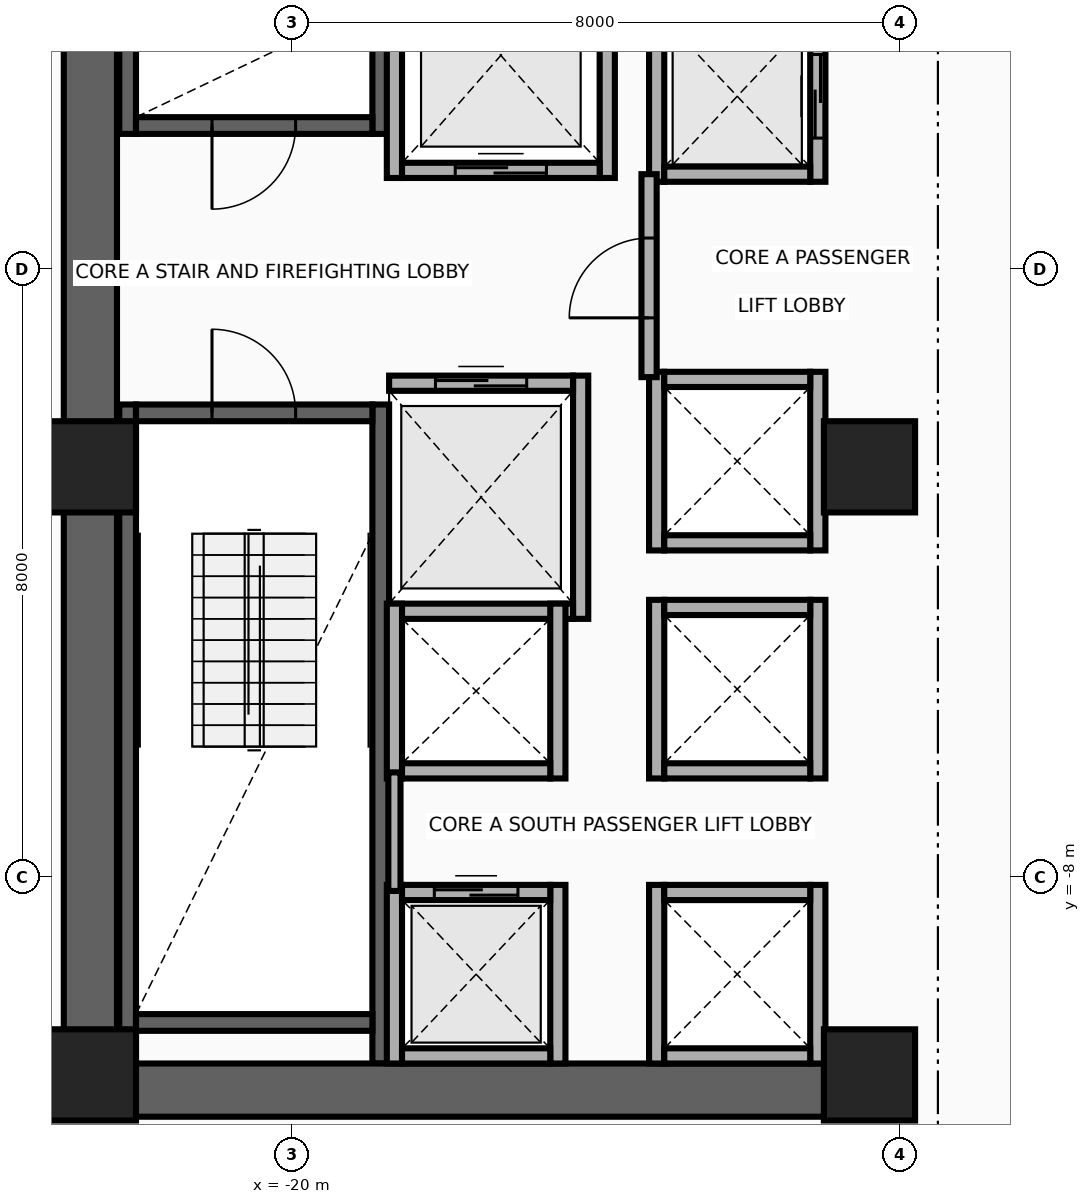
"""IFC4 building model, lengths in metres.
Left out: names, types, materials, properties, quantities, classifications, styles, units other than length and angle.
Written with IfcOpenShell. Run it as: python <this file> out.ifc"""

import sys

from ifc_helpers import new_model, si_unit, direction, frame, frame_2d, origin, origin_2d, place, context, subcontext, project, spatial, rectangle, extrude, source, transform, mapped, element, fill, save


model = new_model("IFC4")
c1 = context("Model", 3, precision=1e-05, world=origin(), true_north=direction((0.0, 1.0)))
c2 = subcontext(c1, "Body", "Model", "MODEL_VIEW")
j1 = project(units=[si_unit("LENGTHUNIT", "METRE"), si_unit("PLANEANGLEUNIT", "RADIAN")], contexts=[c1])
p1 = place(None, origin())
s1 = spatial("IfcSite", under=j1, at=p1, CompositionType="ELEMENT")
p2 = place(p1, origin())
s2 = spatial("IfcBuilding", under=s1, at=p2, CompositionType="ELEMENT")
p3 = place(p2, frame((0.0, 0.0, 105.7)))
s3 = spatial("IfcBuildingStorey", under=s2, at=p3, CompositionType="ELEMENT", Elevation=105.7)
for number, where, z_axis, x_axis in (
    (1, (-22.16, 1.78, 0.0), (0.0, 0.0, 1.0), (0.0, 1.0, 0.0)),
    (2, (-18.83, 1.78, 0.0), (0.0, 0.0, 1.0), (0.0, 1.0, 0.0)),
):
    element("IfcWall", number, at=place(p3, frame(where, z_axis=z_axis, x_axis=x_axis)), inside=s3, PredefinedType="SHEAR", context=c2, shape_type="SweptSolid", body=[
        extrude(rectangle(XDim=8.67, YDim=0.22, at=frame_2d((4.335, 0.0))), origin(), (0.0, 0.0, 1.0), 3.46),
    ])
p4 = place(p3, frame((-22.05, 1.89, 0.0), z_axis=(0.0, 0.0, 1.0), x_axis=(1.0, 0.0, 0.0)))
e3 = element("IfcWall", 3, at=p4, inside=s3, PredefinedType="SHEAR", context=c2, shape_type="SweptSolid", body=[
    extrude(rectangle(XDim=3.11, YDim=0.22, at=frame_2d((1.555, 0.0))), origin(), (0.0, 0.0, 1.0), 3.46),
])
p5 = place(p4, frame((1.0, 0.0, 0.0)))
e4 = element("IfcOpeningElement", 4, at=p5, cuts=e3, PredefinedType="OPENING", context=c2, shape_type="SweptSolid", body=[
    extrude(rectangle(XDim=1.1, YDim=2.15, at=frame_2d((0.55, 1.075))), frame((0.0, 0.125, 0.0), z_axis=(0.0, -1.0, 0.0), x_axis=(1.0, 0.0, 0.0)), (0.0, 0.0, 1.0), 0.25),
])
for number, where, z_axis, x_axis in (
    (5, (-22.16, -10.45, 0.0), (0.0, 0.0, 1.0), (0.0, 1.0, 0.0)),
    (6, (-18.83, -10.45, 0.0), (0.0, 0.0, 1.0), (0.0, 1.0, 0.0)),
):
    element("IfcWall", number, at=place(p3, frame(where, z_axis=z_axis, x_axis=x_axis)), inside=s3, PredefinedType="SHEAR", context=c2, shape_type="SweptSolid", body=[
        extrude(rectangle(XDim=8.67, YDim=0.22, at=frame_2d((4.335, 0.0))), origin(), (0.0, 0.0, 1.0), 3.46),
    ])
p6 = place(p3, frame((-22.05, -9.91, 0.0), z_axis=(0.0, 0.0, 1.0), x_axis=(1.0, 0.0, 0.0)))
e7 = element("IfcWall", 7, at=p6, inside=s3, PredefinedType="SHEAR", context=c2, shape_type="SweptSolid", body=[
    extrude(rectangle(XDim=3.11, YDim=0.22, at=frame_2d((1.555, 0.0))), origin(), (0.0, 0.0, 1.0), 3.46),
])
p7 = place(p3, frame((-22.05, -1.89, 0.0), z_axis=(0.0, 0.0, 1.0), x_axis=(1.0, 0.0, 0.0)))
e8 = element("IfcWall", 8, at=p7, inside=s3, PredefinedType="SHEAR", context=c2, shape_type="SweptSolid", body=[
    extrude(rectangle(XDim=3.11, YDim=0.22, at=frame_2d((1.555, 0.0))), origin(), (0.0, 0.0, 1.0), 3.46),
])
p8 = place(p7, frame((1.0, 0.0, 0.0)))
e9 = element("IfcOpeningElement", 9, at=p8, cuts=e8, PredefinedType="OPENING", context=c2, shape_type="SweptSolid", body=[
    extrude(rectangle(XDim=1.1, YDim=2.15, at=frame_2d((0.55, 1.075))), frame((0.0, 0.125, 0.0), z_axis=(0.0, -1.0, 0.0), x_axis=(1.0, 0.0, 0.0)), (0.0, 0.0, 1.0), 0.25),
])
p9 = place(p3, frame((-22.65, -11.15, 0.0), z_axis=(0.0, 0.0, 1.0), x_axis=(0.0, 1.0, 0.0)))
e10 = element("IfcWall", 10, at=p9, inside=s3, PredefinedType="SHEAR", context=c2, shape_type="SweptSolid", body=[
    extrude(rectangle(XDim=22.3, YDim=0.7, at=frame_2d((11.15, 0.0))), origin(), (0.0, 0.0, 1.0), 3.46),
])
p10 = place(p3, frame((-22.65, -10.8, 0.0), z_axis=(0.0, 0.0, 1.0), x_axis=(1.0, 0.0, 0.0)))
e11 = element("IfcWall", 11, at=p10, inside=s3, PredefinedType="SHEAR", context=c2, shape_type="SweptSolid", body=[
    extrude(rectangle(XDim=10.25, YDim=0.7, at=frame_2d((5.125, 0.0))), origin(), (0.0, 0.0, 1.0), 3.46),
])
m1 = source(origin(), c2, "Body", "SweptSolid", [
    extrude(rectangle(XDim=1.2, YDim=1.2, at=origin_2d()), origin(), (0.0, 0.0, 1.0), 3.7),
])
for number, where, z_axis, x_axis in (
    (12, (-22.65, -10.6, 0.0), (0.0, 0.0, 1.0), (1.0, 0.0, 0.0)),
    (13, (-12.4, -10.6, 0.0), (0.0, 0.0, 1.0), (1.0, 0.0, 0.0)),
    (14, (-22.65, -2.6, 0.0), (0.0, 0.0, 1.0), (1.0, 0.0, 0.0)),
    (15, (-12.4, -2.6, 0.0), (0.0, 0.0, 1.0), (1.0, 0.0, 0.0)),
):
    element("IfcColumn", number, at=place(p3, frame(where, z_axis=z_axis, x_axis=x_axis)), inside=s3, PredefinedType="COLUMN", context=c2, shape_type="MappedRepresentation", body=[
        mapped(m1, transform((0.0, 0.0, 0.0), x_axis=(1.0, 0.0, 0.0), y_axis=(0.0, 1.0, 0.0), z_axis=(0.0, 0.0, 1.0), scale=1.0)),
    ])
for number, where, z_axis, x_axis in (
    (16, (-18.65, 1.2, 0.0), (0.0, 0.0, 1.0), (0.0, 1.0, 0.0)),
    (17, (-15.85, 1.2, 0.0), (0.0, 0.0, 1.0), (0.0, 1.0, 0.0)),
):
    element("IfcWall", number, at=place(p3, frame(where, z_axis=z_axis, x_axis=x_axis)), inside=s3, PredefinedType="MOVABLE", context=c2, shape_type="SweptSolid", body=[
        extrude(rectangle(XDim=3.225, YDim=0.2, at=frame_2d((1.613, 0.0))), origin(), (0.0, 0.0, 1.0), 3.46),
    ])
p11 = place(p3, frame((-18.55, 1.3, 0.0), z_axis=(0.0, 0.0, 1.0), x_axis=(1.0, 0.0, 0.0)))
e18 = element("IfcWall", 18, at=p11, inside=s3, PredefinedType="MOVABLE", context=c2, shape_type="SweptSolid", body=[
    extrude(rectangle(XDim=2.6, YDim=0.2, at=frame_2d((1.3, 0.0))), origin(), (0.0, 0.0, 1.0), 3.46),
])
p12 = place(p11, frame((0.7, 0.0, 0.0)))
e19 = element("IfcOpeningElement", 19, at=p12, cuts=e18, PredefinedType="OPENING", context=c2, shape_type="SweptSolid", body=[
    extrude(rectangle(XDim=1.2, YDim=2.1, at=frame_2d((0.6, 1.05))), frame((0.0, 0.115, 0.0), z_axis=(0.0, -1.0, 0.0), x_axis=(1.0, 0.0, 0.0)), (0.0, 0.0, 1.0), 0.23),
])
p13 = place(p3, frame((-16.2, -4.6, 0.0), z_axis=(0.0, 0.0, 1.0), x_axis=(0.0, 1.0, 0.0)))
e20 = element("IfcWall", 20, at=p13, inside=s3, PredefinedType="MOVABLE", context=c2, shape_type="SweptSolid", body=[
    extrude(rectangle(XDim=3.2, YDim=0.2, at=frame_2d((1.6, 0.0))), origin(), (0.0, 0.0, 1.0), 3.46),
])
p14 = place(p3, frame((-18.72, -4.5, 0.0), z_axis=(0.0, 0.0, 1.0), x_axis=(1.0, 0.0, 0.0)))
e21 = element("IfcWall", 21, at=p14, inside=s3, PredefinedType="MOVABLE", context=c2, shape_type="SweptSolid", body=[
    extrude(rectangle(XDim=2.42, YDim=0.2, at=frame_2d((1.21, 0.0))), origin(), (0.0, 0.0, 1.0), 3.46),
])
p15 = place(p3, frame((-18.72, -1.5, 0.0), z_axis=(0.0, 0.0, 1.0), x_axis=(1.0, 0.0, 0.0)))
e22 = element("IfcWall", 22, at=p15, inside=s3, PredefinedType="MOVABLE", context=c2, shape_type="SweptSolid", body=[
    extrude(rectangle(XDim=2.42, YDim=0.2, at=frame_2d((1.21, 0.0))), origin(), (0.0, 0.0, 1.0), 3.46),
])
p16 = place(p15, frame((0.61, 0.0, 0.0)))
e23 = element("IfcOpeningElement", 23, at=p16, cuts=e22, PredefinedType="OPENING", context=c2, shape_type="SweptSolid", body=[
    extrude(rectangle(XDim=1.2, YDim=2.1, at=frame_2d((0.6, 1.05))), frame((0.0, 0.115, 0.0), z_axis=(0.0, -1.0, 0.0), x_axis=(1.0, 0.0, 0.0)), (0.0, 0.0, 1.0), 0.23),
])
for number, where, z_axis, x_axis in (
    (24, (-15.2, -10.45, 0.0), (0.0, 0.0, 1.0), (0.0, 1.0, 0.0)),
    (25, (-13.08, -10.45, 0.0), (0.0, 0.0, 1.0), (0.0, 1.0, 0.0)),
):
    element("IfcWall", number, at=place(p3, frame(where, z_axis=z_axis, x_axis=x_axis)), inside=s3, PredefinedType="MOVABLE", context=c2, shape_type="SweptSolid", body=[
        extrude(rectangle(XDim=2.35, YDim=0.2, at=frame_2d((1.175, 0.0))), origin(), (0.0, 0.0, 1.0), 2.666),
    ])
p17 = place(p3, frame((-15.1, -10.35, 0.0), z_axis=(0.0, 0.0, 1.0), x_axis=(1.0, 0.0, 0.0)))
e26 = element("IfcWall", 26, at=p17, inside=s3, PredefinedType="MOVABLE", context=c2, shape_type="SweptSolid", body=[
    extrude(rectangle(XDim=1.92, YDim=0.2, at=frame_2d((0.96, 0.0))), origin(), (0.0, 0.0, 1.0), 2.666),
])
p18 = place(p3, frame((-15.1, -8.2, 0.0), z_axis=(0.0, 0.0, 1.0), x_axis=(1.0, 0.0, 0.0)))
e27 = element("IfcWall", 27, at=p18, inside=s3, PredefinedType="MOVABLE", context=c2, shape_type="SweptSolid", body=[
    extrude(rectangle(XDim=1.92, YDim=0.2, at=frame_2d((0.96, 0.0))), origin(), (0.0, 0.0, 1.0), 3.46),
])
for number, where, z_axis, x_axis in (
    (28, (-15.2, -6.7, 0.0), (0.0, 0.0, 1.0), (0.0, 1.0, 0.0)),
    (29, (-13.08, -6.7, 0.0), (0.0, 0.0, 1.0), (0.0, 1.0, 0.0)),
):
    element("IfcWall", number, at=place(p3, frame(where, z_axis=z_axis, x_axis=x_axis)), inside=s3, PredefinedType="MOVABLE", context=c2, shape_type="SweptSolid", body=[
        extrude(rectangle(XDim=2.35, YDim=0.2, at=frame_2d((1.175, 0.0))), origin(), (0.0, 0.0, 1.0), 3.46),
    ])
for number, where, z_axis, x_axis in (
    (30, (-15.1, -6.6, 0.0), (0.0, 0.0, 1.0), (1.0, 0.0, 0.0)),
    (31, (-15.1, -4.45, 0.0), (0.0, 0.0, 1.0), (1.0, 0.0, 0.0)),
):
    element("IfcWall", number, at=place(p3, frame(where, z_axis=z_axis, x_axis=x_axis)), inside=s3, PredefinedType="MOVABLE", context=c2, shape_type="SweptSolid", body=[
        extrude(rectangle(XDim=1.92, YDim=0.2, at=frame_2d((0.96, 0.0))), origin(), (0.0, 0.0, 1.0), 3.46),
    ])
for number, where, z_axis, x_axis in (
    (32, (-18.65, -10.45, 0.0), (0.0, 0.0, 1.0), (0.0, 1.0, 0.0)),
    (33, (-16.5, -10.45, 0.0), (0.0, 0.0, 1.0), (0.0, 1.0, 0.0)),
):
    element("IfcWall", number, at=place(p3, frame(where, z_axis=z_axis, x_axis=x_axis)), inside=s3, PredefinedType="MOVABLE", context=c2, shape_type="SweptSolid", body=[
        extrude(rectangle(XDim=2.35, YDim=0.2, at=frame_2d((1.175, 0.0))), origin(), (0.0, 0.0, 1.0), 2.666),
    ])
p19 = place(p3, frame((-18.55, -10.35, 0.0), z_axis=(0.0, 0.0, 1.0), x_axis=(1.0, 0.0, 0.0)))
e34 = element("IfcWall", 34, at=p19, inside=s3, PredefinedType="MOVABLE", context=c2, shape_type="SweptSolid", body=[
    extrude(rectangle(XDim=1.95, YDim=0.2, at=frame_2d((0.975, 0.0))), origin(), (0.0, 0.0, 1.0), 2.666),
])
p20 = place(p3, frame((-18.55, -8.2, 0.0), z_axis=(0.0, 0.0, 1.0), x_axis=(1.0, 0.0, 0.0)))
e35 = element("IfcWall", 35, at=p20, inside=s3, PredefinedType="MOVABLE", context=c2, shape_type="SweptSolid", body=[
    extrude(rectangle(XDim=1.95, YDim=0.2, at=frame_2d((0.975, 0.0))), origin(), (0.0, 0.0, 1.0), 3.46),
])
p21 = place(p20, frame((0.425, 0.0, 0.0)))
e36 = element("IfcOpeningElement", 36, at=p21, cuts=e35, PredefinedType="OPENING", context=c2, shape_type="SweptSolid", body=[
    extrude(rectangle(XDim=1.1, YDim=2.1, at=frame_2d((0.55, 1.05))), frame((0.0, 0.115, 0.0), z_axis=(0.0, -1.0, 0.0), x_axis=(1.0, 0.0, 0.0)), (0.0, 0.0, 1.0), 0.23),
])
p22 = place(p3, frame((-15.2, 1.15, 0.0), z_axis=(0.0, 0.0, 1.0), x_axis=(0.0, 1.0, 0.0)))
e37 = element("IfcWall", 37, at=p22, inside=s3, PredefinedType="MOVABLE", context=c2, shape_type="SweptSolid", body=[
    extrude(rectangle(XDim=2.25, YDim=0.2, at=frame_2d((1.125, 0.0))), origin(), (0.0, 0.0, 1.0), 3.46),
])
p23 = place(p3, frame((-13.08, 1.15, 0.0), z_axis=(0.0, 0.0, 1.0), x_axis=(0.0, 1.0, 0.0)))
e38 = element("IfcWall", 38, at=p23, inside=s3, PredefinedType="MOVABLE", context=c2, shape_type="SweptSolid", body=[
    extrude(rectangle(XDim=2.25, YDim=0.2, at=frame_2d((1.125, 0.0))), origin(), (0.0, 0.0, 1.0), 3.46),
])
p24 = place(p23, frame((0.575, 0.0, 0.0)))
e39 = element("IfcOpeningElement", 39, at=p24, cuts=e38, PredefinedType="OPENING", context=c2, shape_type="SweptSolid", body=[
    extrude(rectangle(XDim=1.1, YDim=2.1, at=frame_2d((0.55, 1.05))), frame((0.0, 0.115, 0.0), z_axis=(0.0, -1.0, 0.0), x_axis=(1.0, 0.0, 0.0)), (0.0, 0.0, 1.0), 0.23),
])
p25 = place(p3, frame((-15.1, 1.25, 0.0), z_axis=(0.0, 0.0, 1.0), x_axis=(1.0, 0.0, 0.0)))
e40 = element("IfcWall", 40, at=p25, inside=s3, PredefinedType="MOVABLE", context=c2, shape_type="SweptSolid", body=[
    extrude(rectangle(XDim=1.92, YDim=0.2, at=frame_2d((0.96, 0.0))), origin(), (0.0, 0.0, 1.0), 3.46),
])
for number, where, z_axis, x_axis in (
    (41, (-18.65, -6.7, 0.0), (0.0, 0.0, 1.0), (0.0, 1.0, 0.0)),
    (42, (-16.5, -6.7, 0.0), (0.0, 0.0, 1.0), (0.0, 1.0, 0.0)),
):
    element("IfcWall", number, at=place(p3, frame(where, z_axis=z_axis, x_axis=x_axis)), inside=s3, PredefinedType="MOVABLE", context=c2, shape_type="SweptSolid", body=[
        extrude(rectangle(XDim=2.3, YDim=0.2, at=frame_2d((1.15, 0.0))), origin(), (0.0, 0.0, 1.0), 3.46),
    ])
p26 = place(p3, frame((-18.55, -6.6, 0.0), z_axis=(0.0, 0.0, 1.0), x_axis=(1.0, 0.0, 0.0)))
e43 = element("IfcWall", 43, at=p26, inside=s3, PredefinedType="MOVABLE", context=c2, shape_type="SweptSolid", body=[
    extrude(rectangle(XDim=1.95, YDim=0.2, at=frame_2d((0.975, 0.0))), origin(), (0.0, 0.0, 1.0), 3.46),
])
for number, where, z_axis, x_axis in (
    (44, (-15.2, -3.7, 0.0), (0.0, 0.0, 1.0), (0.0, 1.0, 0.0)),
    (45, (-13.08, -3.7, 0.0), (0.0, 0.0, 1.0), (0.0, 1.0, 0.0)),
):
    element("IfcWall", number, at=place(p3, frame(where, z_axis=z_axis, x_axis=x_axis)), inside=s3, PredefinedType="MOVABLE", context=c2, shape_type="SweptSolid", body=[
        extrude(rectangle(XDim=2.35, YDim=0.2, at=frame_2d((1.175, 0.0))), origin(), (0.0, 0.0, 1.0), 3.46),
    ])
for number, where, z_axis, x_axis in (
    (46, (-15.1, -3.6, 0.0), (0.0, 0.0, 1.0), (1.0, 0.0, 0.0)),
    (47, (-15.1, -1.45, 0.0), (0.0, 0.0, 1.0), (1.0, 0.0, 0.0)),
):
    element("IfcWall", number, at=place(p3, frame(where, z_axis=z_axis, x_axis=x_axis)), inside=s3, PredefinedType="MOVABLE", context=c2, shape_type="SweptSolid", body=[
        extrude(rectangle(XDim=1.92, YDim=0.2, at=frame_2d((0.96, 0.0))), origin(), (0.0, 0.0, 1.0), 3.46),
    ])
p27 = place(p3, frame((-15.3, -1.42, 0.0), z_axis=(0.0, 0.0, 1.0), x_axis=(0.0, 1.0, 0.0)))
e48 = element("IfcWall", 48, at=p27, inside=s3, PredefinedType="PARTITIONING", context=c2, shape_type="SweptSolid", body=[
    extrude(rectangle(XDim=2.67, YDim=0.2, at=frame_2d((1.335, 0.0))), origin(), (0.0, 0.0, 1.0), 3.46),
])
p28 = place(p27, frame((0.78, 0.0, 0.0)))
e49 = element("IfcOpeningElement", 49, at=p28, cuts=e48, PredefinedType="OPENING", context=c2, shape_type="SweptSolid", body=[
    extrude(rectangle(XDim=1.05, YDim=2.15, at=frame_2d((0.525, 1.075))), frame((0.0, 0.115, 0.0), z_axis=(0.0, -1.0, 0.0), x_axis=(1.0, 0.0, 0.0)), (0.0, 0.0, 1.0), 0.23),
])
p29 = place(p3, frame((-18.65, -8.18, 0.0), z_axis=(0.0, 0.0, 1.0), x_axis=(0.0, 1.0, 0.0)))
e50 = element("IfcWall", 50, at=p29, inside=s3, PredefinedType="PARTITIONING", context=c2, shape_type="SweptSolid", body=[
    extrude(rectangle(XDim=1.56, YDim=0.16, at=frame_2d((0.78, 0.0))), origin(), (0.0, 0.0, 1.0), 3.46),
])
p30 = place(p12, origin())
e51 = element("IfcDoor", 51, at=p30, inside=s3, OperationType="DOUBLE_DOOR_SLIDING", PredefinedType="DOOR", context=c2, shape_type="SweptSolid", body=[
    extrude(rectangle(XDim=1.2, YDim=2.1, at=frame_2d((0.6, 1.05))), frame((0.0, 0.025, 0.0), z_axis=(0.0, -1.0, 0.0), x_axis=(1.0, 0.0, 0.0)), (0.0, 0.0, 1.0), 0.05),
])
fill(e19, e51)
p31 = place(p16, origin())
e52 = element("IfcDoor", 52, at=p31, inside=s3, OperationType="DOUBLE_DOOR_SLIDING", PredefinedType="DOOR", context=c2, shape_type="SweptSolid", body=[
    extrude(rectangle(XDim=1.2, YDim=2.1, at=frame_2d((0.6, 1.05))), frame((0.0, 0.025, 0.0), z_axis=(0.0, -1.0, 0.0), x_axis=(1.0, 0.0, 0.0)), (0.0, 0.0, 1.0), 0.05),
])
fill(e23, e52)
p32 = place(p21, origin())
e53 = element("IfcDoor", 53, at=p32, inside=s3, OperationType="DOUBLE_DOOR_SLIDING", PredefinedType="DOOR", context=c2, shape_type="SweptSolid", body=[
    extrude(rectangle(XDim=1.1, YDim=2.1, at=frame_2d((0.55, 1.05))), frame((0.0, 0.025, 0.0), z_axis=(0.0, -1.0, 0.0), x_axis=(1.0, 0.0, 0.0)), (0.0, 0.0, 1.0), 0.05),
])
fill(e36, e53)
p33 = place(p24, origin())
e54 = element("IfcDoor", 54, at=p33, inside=s3, OperationType="DOUBLE_DOOR_SLIDING", PredefinedType="DOOR", context=c2, shape_type="SweptSolid", body=[
    extrude(rectangle(XDim=1.1, YDim=2.1, at=frame_2d((0.55, 1.05))), frame((0.0, 0.025, 0.0), z_axis=(0.0, -1.0, 0.0), x_axis=(1.0, 0.0, 0.0)), (0.0, 0.0, 1.0), 0.05),
])
fill(e39, e54)
p34 = place(p28, origin())
e55 = element("IfcDoor", 55, at=p34, inside=s3, OperationType="SINGLE_SWING_RIGHT", PredefinedType="DOOR", context=c2, shape_type="SweptSolid", body=[
    extrude(rectangle(XDim=1.05, YDim=2.15, at=frame_2d((0.525, 1.075))), frame((0.0, 0.025, 0.0), z_axis=(0.0, -1.0, 0.0), x_axis=(1.0, 0.0, 0.0)), (0.0, 0.0, 1.0), 0.05),
])
fill(e49, e55)
p35 = place(p5, frame((1.1, 0.0, 0.0), z_axis=(0.0, 0.0, 1.0), x_axis=(-1.0, 0.0, 0.0)))
e56 = element("IfcDoor", 56, at=p35, inside=s3, OperationType="SINGLE_SWING_LEFT", PredefinedType="DOOR", context=c2, shape_type="SweptSolid", body=[
    extrude(rectangle(XDim=1.1, YDim=2.15, at=frame_2d((0.55, 1.075))), frame((0.0, 0.025, 0.0), z_axis=(0.0, -1.0, 0.0), x_axis=(1.0, 0.0, 0.0)), (0.0, 0.0, 1.0), 0.05),
])
fill(e4, e56)
p36 = place(p8, origin())
e57 = element("IfcDoor", 57, at=p36, inside=s3, OperationType="SINGLE_SWING_RIGHT", PredefinedType="DOOR", context=c2, shape_type="SweptSolid", body=[
    extrude(rectangle(XDim=1.1, YDim=2.15, at=frame_2d((0.55, 1.075))), frame((0.0, 0.025, 0.0), z_axis=(0.0, -1.0, 0.0), x_axis=(1.0, 0.0, 0.0)), (0.0, 0.0, 1.0), 0.05),
])
fill(e9, e57)
save(model, sys.argv[1])
